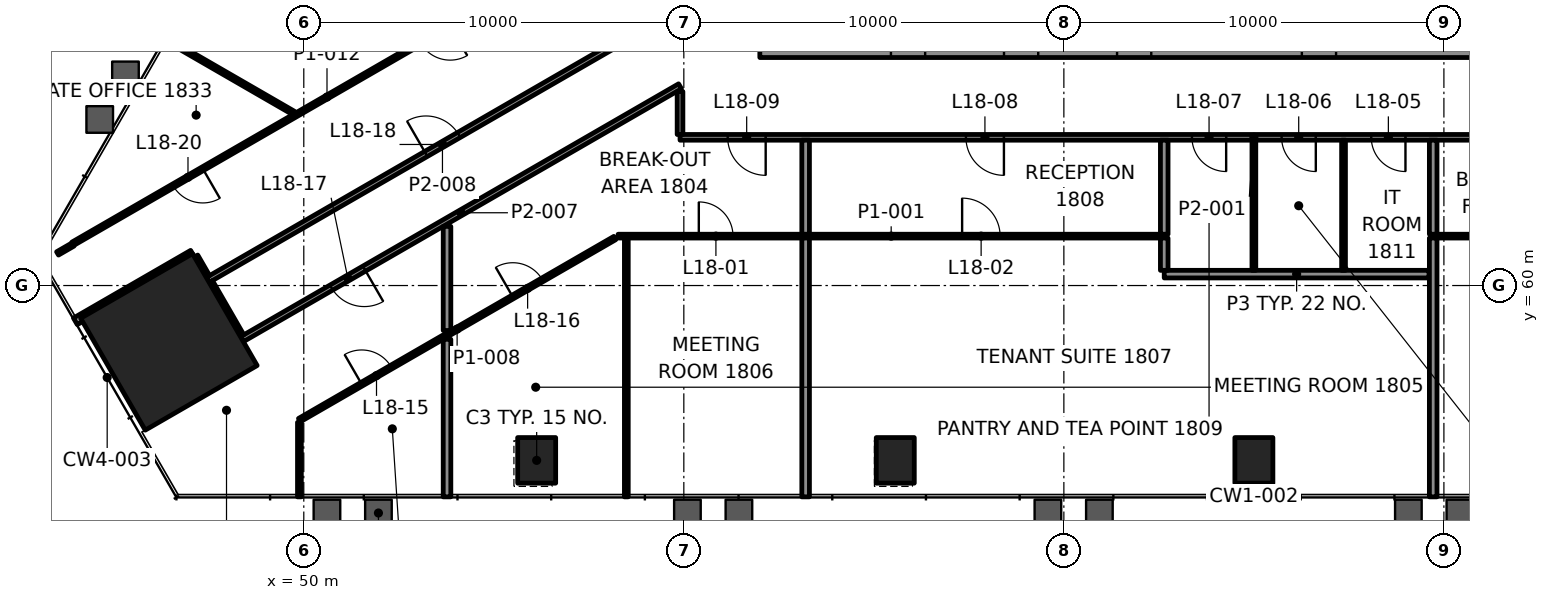
"""IFC4 building model, lengths in metres.
Left out: names, types, materials, properties, quantities, classifications, styles, units other than length and angle.
Written with IfcOpenShell. Run it as: python <this file> out.ifc"""

import sys

from ifc_helpers import new_model, si_unit, direction, frame, frame_2d, origin, origin_2d, place, context, subcontext, project, spatial, rectangle, extrude, element, fill, save


model = new_model("IFC4")
c1 = context("Model", 3, precision=1e-05, world=origin(), true_north=direction((0.0, 1.0)))
c2 = subcontext(c1, "Body", "Model", "MODEL_VIEW")
j1 = project(units=[si_unit("LENGTHUNIT", "METRE"), si_unit("PLANEANGLEUNIT", "RADIAN")], contexts=[c1])
p1 = place(None, origin())
s1 = spatial("IfcSite", under=j1, at=p1, CompositionType="ELEMENT")
p2 = place(p1, origin())
s2 = spatial("IfcBuilding", under=s1, at=p2, CompositionType="ELEMENT")
p3 = place(p2, frame((0.0, 0.0, 82.0)))
s3 = spatial("IfcBuildingStorey", under=s2, at=p3, CompositionType="ELEMENT", Elevation=82.0)
p4 = place(p3, frame((46.45, 58.517, 0.0), z_axis=(0.0, 0.0, 1.0), x_axis=(0.5, -0.866025403784, 0.0)))
e1 = element("IfcColumn", 1, at=p4, inside=s3, PredefinedType="COLUMN", context=c2, shape_type="SweptSolid", body=[
    extrude(rectangle(XDim=3.4, YDim=3.4, at=origin_2d()), origin(), (0.0, 0.0, 1.0), 4.2),
])
for number, where, z_axis, x_axis in (
    (2, (56.128, 55.399, -0.0), (0.0, 0.0, 1.0), (1.0, 0.0, 0.0)),
    (3, (65.564, 55.399, -0.0), (0.0, 0.0, 1.0), (1.0, 0.0, 0.0)),
    (4, (75.0, 55.399, -0.0), (0.0, 0.0, 1.0), (1.0, 0.0, 0.0)),
):
    element("IfcColumn", number, at=place(p3, frame(where, z_axis=z_axis, x_axis=x_axis)), inside=s3, PredefinedType="COLUMN", context=c2, shape_type="SweptSolid", body=[
        extrude(rectangle(XDim=1.0, YDim=1.2, at=origin_2d()), origin(), (0.0, 0.0, 1.0), 4.2),
    ])
p5 = place(p3, frame((62.0, 66.45, 0.0), z_axis=(0.0, 0.0, 1.0), x_axis=(1.0, 0.0, 0.0)))
e5 = element("IfcWall", 5, at=p5, inside=s3, PredefinedType="SHEAR", context=c2, shape_type="SweptSolid", body=[
    extrude(rectangle(XDim=26.0, YDim=0.9, at=frame_2d((13.0, 0.0))), origin(), (0.0, 0.0, 1.0), 4.0),
])
p6 = place(p5, frame((3.45, 0.0, 0.0)))
e6 = element("IfcOpeningElement", 6, at=p6, cuts=e5, PredefinedType="OPENING", context=c2, shape_type="SweptSolid", body=[
    extrude(rectangle(XDim=0.9, YDim=2.1, at=frame_2d((0.45, 1.05))), frame((0.0, 0.46, 0.0), z_axis=(0.0, -1.0, 0.0), x_axis=(1.0, 0.0, 0.0)), (0.0, 0.0, 1.0), 0.92),
])
p7 = place(p5, frame((6.425, 0.0, 0.0)))
e7 = element("IfcOpeningElement", 7, at=p7, cuts=e5, PredefinedType="OPENING", context=c2, shape_type="SweptSolid", body=[
    extrude(rectangle(XDim=0.9, YDim=2.1, at=frame_2d((0.45, 1.05))), frame((0.0, 0.46, 0.0), z_axis=(0.0, -1.0, 0.0), x_axis=(1.0, 0.0, 0.0)), (0.0, 0.0, 1.0), 0.92),
])
p8 = place(p5, frame((9.4, 0.0, 0.0)))
e8 = element("IfcOpeningElement", 8, at=p8, cuts=e5, PredefinedType="OPENING", context=c2, shape_type="SweptSolid", body=[
    extrude(rectangle(XDim=0.9, YDim=2.1, at=frame_2d((0.45, 1.05))), frame((0.0, 0.46, 0.0), z_axis=(0.0, -1.0, 0.0), x_axis=(1.0, 0.0, 0.0)), (0.0, 0.0, 1.0), 0.92),
])
p9 = place(p5, frame((14.262, 0.0, 0.0)))
e9 = element("IfcOpeningElement", 9, at=p9, cuts=e5, PredefinedType="OPENING", context=c2, shape_type="SweptSolid", body=[
    extrude(rectangle(XDim=0.9, YDim=2.1, at=frame_2d((0.45, 1.05))), frame((0.0, 0.46, 0.0), z_axis=(0.0, -1.0, 0.0), x_axis=(1.0, 0.0, 0.0)), (0.0, 0.0, 1.0), 0.92),
])
p10 = place(p5, frame((21.188, 0.0, 0.0)))
e10 = element("IfcOpeningElement", 10, at=p10, cuts=e5, PredefinedType="OPENING", context=c2, shape_type="SweptSolid", body=[
    extrude(rectangle(XDim=0.9, YDim=2.1, at=frame_2d((0.45, 1.05))), frame((0.0, 0.46, 0.0), z_axis=(0.0, -1.0, 0.0), x_axis=(1.0, 0.0, 0.0)), (0.0, 0.0, 1.0), 0.92),
])
p11 = place(p3, frame((72.641, 60.3, 0.0), z_axis=(0.0, 0.0, 1.0), x_axis=(1.0, 0.0, 0.0)))
e11 = element("IfcWall", 11, at=p11, inside=s3, PredefinedType="PARTITIONING", context=c2, shape_type="SweptSolid", body=[
    extrude(rectangle(XDim=6.967, YDim=0.2, at=frame_2d((3.484, 0.0))), origin(), (0.0, 0.0, 1.0), 3.4),
])
p12 = place(p3, frame((58.271, 61.3, 0.0), z_axis=(0.0, 0.0, 1.0), x_axis=(1.0, 0.0, 0.0)))
e12 = element("IfcWall", 12, at=p12, inside=s3, PredefinedType="PARTITIONING", context=c2, shape_type="SweptSolid", body=[
    extrude(rectangle(XDim=14.37, YDim=0.1, at=frame_2d((7.185, 0.0))), origin(), (0.0, 0.0, 1.0), 3.4),
])
p13 = place(p12, frame((2.123, 0.0, 0.0)))
e13 = element("IfcOpeningElement", 13, at=p13, cuts=e12, PredefinedType="OPENING", context=c2, shape_type="SweptSolid", body=[
    extrude(rectangle(XDim=0.9, YDim=2.1, at=frame_2d((0.45, 1.05))), frame((0.0, 0.06, 0.0), z_axis=(0.0, -1.0, 0.0), x_axis=(1.0, 0.0, 0.0)), (0.0, 0.0, 1.0), 0.12),
])
p14 = place(p12, frame((9.052, 0.0, 0.0)))
e14 = element("IfcOpeningElement", 14, at=p14, cuts=e12, PredefinedType="OPENING", context=c2, shape_type="SweptSolid", body=[
    extrude(rectangle(XDim=1.0, YDim=2.1, at=frame_2d((0.5, 1.05))), frame((0.0, 0.06, 0.0), z_axis=(0.0, -1.0, 0.0), x_axis=(1.0, 0.0, 0.0)), (0.0, 0.0, 1.0), 0.12),
])
p15 = place(p3, frame((79.718, 61.3, 0.0), z_axis=(0.0, 0.0, 1.0), x_axis=(1.0, 0.0, 0.0)))
e15 = element("IfcWall", 15, at=p15, inside=s3, PredefinedType="PARTITIONING", context=c2, shape_type="SweptSolid", body=[
    extrude(rectangle(XDim=11.911, YDim=0.1, at=frame_2d((5.956, 0.0))), origin(), (0.0, 0.0, 1.0), 3.4),
])
p16 = place(p15, frame((5.355, 0.0, 0.0)))
e16 = element("IfcOpeningElement", 16, at=p16, cuts=e15, PredefinedType="OPENING", context=c2, shape_type="SweptSolid", body=[
    extrude(rectangle(XDim=1.2, YDim=2.1, at=frame_2d((0.6, 1.05))), frame((0.0, 0.06, 0.0), z_axis=(0.0, -1.0, 0.0), x_axis=(1.0, 0.0, 0.0)), (0.0, 0.0, 1.0), 0.12),
])
p17 = place(p3, frame((90.1, 63.9, 0.0), z_axis=(0.0, 0.0, 1.0), x_axis=(-1.0, 0.0, 0.0)))
e17 = element("IfcWall", 17, at=p17, inside=s3, PredefinedType="PARTITIONING", context=c2, shape_type="SweptSolid", body=[
    extrude(rectangle(XDim=30.2, YDim=0.15, at=frame_2d((15.1, 0.0))), origin(), (0.0, 0.0, 1.0), 3.4),
])
p18 = place(p17, frame((4.792, 0.0, 0.0)))
e18 = element("IfcOpeningElement", 18, at=p18, cuts=e17, PredefinedType="OPENING", context=c2, shape_type="SweptSolid", body=[
    extrude(rectangle(XDim=1.0, YDim=2.1, at=frame_2d((0.5, 1.05))), frame((0.0, 0.085, 0.0), z_axis=(0.0, -1.0, 0.0), x_axis=(1.0, 0.0, 0.0)), (0.0, 0.0, 1.0), 0.17),
])
p19 = place(p17, frame((11.111, 0.0, 0.0)))
e19 = element("IfcOpeningElement", 19, at=p19, cuts=e17, PredefinedType="OPENING", context=c2, shape_type="SweptSolid", body=[
    extrude(rectangle(XDim=0.9, YDim=2.1, at=frame_2d((0.45, 1.05))), frame((0.0, 0.085, 0.0), z_axis=(0.0, -1.0, 0.0), x_axis=(1.0, 0.0, 0.0)), (0.0, 0.0, 1.0), 0.17),
])
p20 = place(p17, frame((13.47, 0.0, 0.0)))
e20 = element("IfcOpeningElement", 20, at=p20, cuts=e17, PredefinedType="OPENING", context=c2, shape_type="SweptSolid", body=[
    extrude(rectangle(XDim=0.9, YDim=2.1, at=frame_2d((0.45, 1.05))), frame((0.0, 0.085, 0.0), z_axis=(0.0, -1.0, 0.0), x_axis=(1.0, 0.0, 0.0)), (0.0, 0.0, 1.0), 0.17),
])
p21 = place(p17, frame((15.83, 0.0, 0.0)))
e21 = element("IfcOpeningElement", 21, at=p21, cuts=e17, PredefinedType="OPENING", context=c2, shape_type="SweptSolid", body=[
    extrude(rectangle(XDim=0.9, YDim=2.1, at=frame_2d((0.45, 1.05))), frame((0.0, 0.085, 0.0), z_axis=(0.0, -1.0, 0.0), x_axis=(1.0, 0.0, 0.0)), (0.0, 0.0, 1.0), 0.17),
])
p22 = place(p17, frame((21.677, 0.0, 0.0)))
e22 = element("IfcOpeningElement", 22, at=p22, cuts=e17, PredefinedType="OPENING", context=c2, shape_type="SweptSolid", body=[
    extrude(rectangle(XDim=1.0, YDim=2.1, at=frame_2d((0.5, 1.05))), frame((0.0, 0.085, 0.0), z_axis=(0.0, -1.0, 0.0), x_axis=(1.0, 0.0, 0.0)), (0.0, 0.0, 1.0), 0.17),
])
p23 = place(p17, frame((27.946, 0.0, 0.0)))
e23 = element("IfcOpeningElement", 23, at=p23, cuts=e17, PredefinedType="OPENING", context=c2, shape_type="SweptSolid", body=[
    extrude(rectangle(XDim=1.0, YDim=2.1, at=frame_2d((0.5, 1.05))), frame((0.0, 0.085, 0.0), z_axis=(0.0, -1.0, 0.0), x_axis=(1.0, 0.0, 0.0)), (0.0, 0.0, 1.0), 0.17),
])
p24 = place(p3, frame((49.885, 56.458, 0.0), z_axis=(0.0, 0.0, 1.0), x_axis=(0.866030313286, 0.499991496398, 0.0)))
e24 = element("IfcWall", 24, at=p24, inside=s3, PredefinedType="PARTITIONING", context=c2, shape_type="SweptSolid", body=[
    extrude(rectangle(XDim=9.583, YDim=0.1, at=frame_2d((4.792, 0.0))), origin(), (0.0, 0.0, 1.0), 3.4),
])
p25 = place(p24, frame((1.892, 0.0, 0.0)))
e25 = element("IfcOpeningElement", 25, at=p25, cuts=e24, PredefinedType="OPENING", context=c2, shape_type="SweptSolid", body=[
    extrude(rectangle(XDim=0.9, YDim=2.1, at=frame_2d((0.45, 1.05))), frame((0.0, 0.06, 0.0), z_axis=(0.0, -1.0, 0.0), x_axis=(1.0, 0.0, 0.0)), (0.0, 0.0, 1.0), 0.12),
])
p26 = place(p24, frame((6.484, 0.0, 0.0)))
e26 = element("IfcOpeningElement", 26, at=p26, cuts=e24, PredefinedType="OPENING", context=c2, shape_type="SweptSolid", body=[
    extrude(rectangle(XDim=0.9, YDim=2.1, at=frame_2d((0.45, 1.05))), frame((0.0, 0.06, 0.0), z_axis=(0.0, -1.0, 0.0), x_axis=(1.0, 0.0, 0.0)), (0.0, 0.0, 1.0), 0.12),
])
p27 = place(p3, frame((59.9, 65.243, 0.0), z_axis=(0.0, 0.0, 1.0), x_axis=(-0.866025527764, -0.499999785261, 0.0)))
e27 = element("IfcWall", 27, at=p27, inside=s3, PredefinedType="PARTITIONING", context=c2, shape_type="SweptSolid", body=[
    extrude(rectangle(XDim=13.31, YDim=0.15, at=frame_2d((6.655, 0.0))), origin(), (0.0, 0.0, 1.0), 3.247),
])
p28 = place(p27, frame((9.594, 0.0, 0.0)))
e28 = element("IfcOpeningElement", 28, at=p28, cuts=e27, PredefinedType="OPENING", context=c2, shape_type="SweptSolid", body=[
    extrude(rectangle(XDim=1.0, YDim=2.1, at=frame_2d((0.5, 1.05))), frame((0.0, 0.085, 0.0), z_axis=(0.0, -1.0, 0.0), x_axis=(1.0, 0.0, 0.0)), (0.0, 0.0, 1.0), 0.17),
])
p29 = place(p3, frame((47.473, 60.146, 0.0), z_axis=(0.0, 0.0, 1.0), x_axis=(0.866025677055, 0.499999526681, 0.0)))
e29 = element("IfcWall", 29, at=p29, inside=s3, PredefinedType="PARTITIONING", context=c2, shape_type="SweptSolid", body=[
    extrude(rectangle(XDim=14.263, YDim=0.15, at=frame_2d((7.132, 0.0))), origin(), (0.0, 0.0, 1.0), 3.4),
])
p30 = place(p29, frame((6.632, 0.0, 0.0)))
e30 = element("IfcOpeningElement", 30, at=p30, cuts=e29, PredefinedType="OPENING", context=c2, shape_type="SweptSolid", body=[
    extrude(rectangle(XDim=1.0, YDim=2.1, at=frame_2d((0.5, 1.05))), frame((0.0, 0.085, 0.0), z_axis=(0.0, -1.0, 0.0), x_axis=(1.0, 0.0, 0.0)), (0.0, 0.0, 1.0), 0.17),
])
p31 = place(p3, frame((43.99, 59.058, 0.0), z_axis=(0.0, 0.0, 1.0), x_axis=(0.866031398331, 0.499989616998, 0.0)))
e31 = element("IfcWall", 31, at=p31, inside=s3, PredefinedType="PARTITIONING", context=c2, shape_type="SweptSolid", body=[
    extrude(rectangle(XDim=3.56, YDim=0.2, at=frame_2d((1.78, 0.0))), origin(), (0.0, 0.0, 1.0), 3.4),
])
p32 = place(p3, frame((43.521, 60.845, 0.0), z_axis=(0.0, 0.0, 1.0), x_axis=(0.865979310119, 0.500079828073, 0.0)))
e32 = element("IfcWall", 32, at=p32, inside=s3, PredefinedType="PARTITIONING", context=c2, shape_type="SweptSolid", body=[
    extrude(rectangle(XDim=0.473, YDim=0.1, at=frame_2d((0.237, 0.0))), origin(), (0.0, 0.0, 1.0), 3.4),
])
p33 = place(p3, frame((57.3, 68.823, 0.0), z_axis=(0.0, 0.0, 1.0), x_axis=(-0.866026891502, -0.499997423189, 0.0)))
e33 = element("IfcWall", 33, at=p33, inside=s3, PredefinedType="PARTITIONING", context=c2, shape_type="SweptSolid", body=[
    extrude(rectangle(XDim=15.448, YDim=0.1, at=frame_2d((7.724, 0.0))), origin(), (0.0, 0.0, 1.0), 3.4),
])
p34 = place(p33, frame((3.982, 0.0, 0.0)))
e34 = element("IfcOpeningElement", 34, at=p34, cuts=e33, PredefinedType="OPENING", context=c2, shape_type="SweptSolid", body=[
    extrude(rectangle(XDim=0.9, YDim=2.1, at=frame_2d((0.45, 1.05))), frame((0.0, 0.06, 0.0), z_axis=(0.0, -1.0, 0.0), x_axis=(1.0, 0.0, 0.0)), (0.0, 0.0, 1.0), 0.12),
])
p35 = place(p33, frame((11.498, 0.0, 0.0)))
e35 = element("IfcOpeningElement", 35, at=p35, cuts=e33, PredefinedType="OPENING", context=c2, shape_type="SweptSolid", body=[
    extrude(rectangle(XDim=0.9, YDim=2.1, at=frame_2d((0.45, 1.05))), frame((0.0, 0.06, 0.0), z_axis=(0.0, -1.0, 0.0), x_axis=(1.0, 0.0, 0.0)), (0.0, 0.0, 1.0), 0.12),
])
p36 = place(p3, frame((79.718, 54.439, 0.0), z_axis=(0.0, 0.0, 1.0), x_axis=(0.0, 1.0, 0.0)))
e36 = element("IfcWall", 36, at=p36, inside=s3, PredefinedType="PARTITIONING", context=c2, shape_type="SweptSolid", body=[
    extrude(rectangle(XDim=6.811, YDim=0.2, at=frame_2d((3.405, 0.0))), origin(), (0.0, 0.0, 1.0), 3.165),
])
for number, where, z_axis, x_axis in (
    (37, (77.359, 60.4, 0.0), (0.0, 0.0, 1.0), (0.0, 1.0, 0.0)),
    (38, (75.0, 60.4, 0.0), (0.0, 0.0, 1.0), (0.0, 1.0, 0.0)),
):
    element("IfcWall", number, at=place(p3, frame(where, z_axis=z_axis, x_axis=x_axis)), inside=s3, PredefinedType="PARTITIONING", context=c2, shape_type="SweptSolid", body=[
        extrude(rectangle(XDim=3.425, YDim=0.1, at=frame_2d((1.712, 0.0))), origin(), (0.0, 0.0, 1.0), 3.4),
    ])
p37 = place(p3, frame((72.641, 60.4, 0.0), z_axis=(0.0, 0.0, 1.0), x_axis=(0.0, 1.0, 0.0)))
e39 = element("IfcWall", 39, at=p37, inside=s3, PredefinedType="PARTITIONING", context=c2, shape_type="SweptSolid", body=[
    extrude(rectangle(XDim=0.85, YDim=0.2, at=frame_2d((0.425, 0.0))), origin(), (0.0, 0.0, 1.0), 3.4),
])
p38 = place(p3, frame((63.205, 54.439, 0.0), z_axis=(0.0, 0.0, 1.0), x_axis=(0.0, 1.0, 0.0)))
e40 = element("IfcWall", 40, at=p38, inside=s3, PredefinedType="PARTITIONING", context=c2, shape_type="SweptSolid", body=[
    extrude(rectangle(XDim=6.811, YDim=0.2, at=frame_2d((3.405, 0.0))), origin(), (0.0, 0.0, 1.0), 3.165),
])
p39 = place(p3, frame((59.9, 63.975, 0.0), z_axis=(0.0, 0.0, 1.0), x_axis=(0.0, 1.0, 0.0)))
e41 = element("IfcWall", 41, at=p39, inside=s3, PredefinedType="PARTITIONING", context=c2, shape_type="SweptSolid", body=[
    extrude(rectangle(XDim=1.131, YDim=0.15, at=frame_2d((0.565, 0.0))), origin(), (0.0, 0.0, 1.0), 3.247),
])
p40 = place(p3, frame((58.487, 54.439, 0.0), z_axis=(0.0, 0.0, 1.0), x_axis=(0.0, 1.0, 0.0)))
e42 = element("IfcWall", 42, at=p40, inside=s3, PredefinedType="PARTITIONING", context=c2, shape_type="SweptSolid", body=[
    extrude(rectangle(XDim=6.811, YDim=0.1, at=frame_2d((3.405, 0.0))), origin(), (0.0, 0.0, 1.0), 3.165),
])
p41 = place(p3, frame((53.769, 54.439, 0.0), z_axis=(0.0, 0.0, 1.0), x_axis=(0.0, 1.0, 0.0)))
e43 = element("IfcWall", 43, at=p41, inside=s3, PredefinedType="PARTITIONING", context=c2, shape_type="SweptSolid", body=[
    extrude(rectangle(XDim=4.146, YDim=0.2, at=frame_2d((2.073, 0.0))), origin(), (0.0, 0.0, 1.0), 3.4),
])
p42 = place(p3, frame((49.885, 54.439, 0.0), z_axis=(0.0, 0.0, 1.0), x_axis=(0.0, 1.0, 0.0)))
e44 = element("IfcWall", 44, at=p42, inside=s3, PredefinedType="PARTITIONING", context=c2, shape_type="SweptSolid", body=[
    extrude(rectangle(XDim=1.961, YDim=0.1, at=frame_2d((0.981, 0.0))), origin(), (0.0, 0.0, 1.0), 3.4),
])
p43 = place(p3, frame((48.335, 58.653, 0.0), z_axis=(0.0, 0.0, 1.0), x_axis=(-0.499991515992, 0.866030301974, 0.0)))
e45 = element("IfcWall", 45, at=p43, inside=s3, PredefinedType="PARTITIONING", context=c2, shape_type="SweptSolid", body=[
    extrude(rectangle(XDim=1.649, YDim=0.2, at=frame_2d((0.825, 0.0))), origin(), (0.0, 0.0, 1.0), 3.247),
])
p44 = place(p3, frame((49.732, 64.541, 0.0), z_axis=(0.0, 0.0, 1.0), x_axis=(-0.866020177134, 0.500009052715, 0.0)))
e46 = element("IfcWall", 46, at=p44, inside=s3, PredefinedType="PARTITIONING", context=c2, shape_type="SweptSolid", body=[
    extrude(rectangle(XDim=3.908, YDim=0.1, at=frame_2d((1.954, 0.0))), origin(), (0.0, 0.0, 1.0), 3.4),
])
for number, where, z_axis, x_axis in (
    (47, (72.641, 61.35, 0.0), (0.0, 0.0, 1.0), (0.0, 1.0, 0.0)),
    (48, (79.718, 61.35, 0.0), (0.0, 0.0, 1.0), (0.0, 1.0, 0.0)),
):
    element("IfcWall", number, at=place(p3, frame(where, z_axis=z_axis, x_axis=x_axis)), inside=s3, PredefinedType="PARTITIONING", context=c2, shape_type="SweptSolid", body=[
        extrude(rectangle(XDim=2.475, YDim=0.2, at=frame_2d((1.237, 0.0))), origin(), (0.0, 0.0, 1.0), 3.4),
    ])
p45 = place(p3, frame((53.769, 58.816, 0.0), z_axis=(0.0, 0.0, 1.0), x_axis=(0.0, 1.0, 0.0)))
e49 = element("IfcWall", 49, at=p45, inside=s3, PredefinedType="PARTITIONING", context=c2, shape_type="SweptSolid", body=[
    extrude(rectangle(XDim=2.74, YDim=0.2, at=frame_2d((1.37, 0.0))), origin(), (0.0, 0.0, 1.0), 3.4),
])
p46 = place(p3, frame((47.435, 60.211, 0.0), z_axis=(0.0, 0.0, 1.0), x_axis=(-0.499801510763, 0.866139971275, 0.0)))
e50 = element("IfcWall", 50, at=p46, inside=s3, PredefinedType="PARTITIONING", context=c2, shape_type="SweptSolid", body=[
    extrude(rectangle(XDim=0.624, YDim=0.2, at=frame_2d((0.312, 0.0))), origin(), (0.0, 0.0, 1.0), 3.4),
])
p47 = place(p3, frame((63.205, 61.35, 0.0), z_axis=(0.0, 0.0, 1.0), x_axis=(0.0, 1.0, 0.0)))
e51 = element("IfcWall", 51, at=p47, inside=s3, PredefinedType="PARTITIONING", context=c2, shape_type="SweptSolid", body=[
    extrude(rectangle(XDim=2.475, YDim=0.2, at=frame_2d((1.237, 0.0))), origin(), (0.0, 0.0, 1.0), 3.4),
])
p48 = place(p3, frame((110.601, 61.239, 0.0), z_axis=(0.0, 0.0, 1.0), x_axis=(-0.499998492585, 0.866026274089, 0.0)))
e52 = element("IfcWall", 52, at=p48, inside=s3, PredefinedType="SOLIDWALL", context=c2, shape_type="SweptSolid", body=[
    extrude(rectangle(XDim=59.436, YDim=0.8, at=frame_2d((29.718, 0.0))), origin(), (0.0, 0.0, 1.0), 0.9),
])
p49 = place(p13, origin())
e53 = element("IfcDoor", 53, at=p49, inside=s3, OperationType="SINGLE_SWING_LEFT", PredefinedType="DOOR", context=c2, shape_type="SweptSolid", body=[
    extrude(rectangle(XDim=0.9, YDim=2.1, at=frame_2d((0.45, 1.05))), frame((0.0, 0.025, 0.0), z_axis=(0.0, -1.0, 0.0), x_axis=(1.0, 0.0, 0.0)), (0.0, 0.0, 1.0), 0.05),
])
fill(e13, e53)
p50 = place(p14, origin())
e54 = element("IfcDoor", 54, at=p50, inside=s3, OperationType="SINGLE_SWING_RIGHT", PredefinedType="DOOR", context=c2, shape_type="SweptSolid", body=[
    extrude(rectangle(XDim=1.0, YDim=2.1, at=frame_2d((0.5, 1.05))), frame((0.0, 0.025, 0.0), z_axis=(0.0, -1.0, 0.0), x_axis=(1.0, 0.0, 0.0)), (0.0, 0.0, 1.0), 0.05),
])
fill(e14, e54)
p51 = place(p19, origin())
e55 = element("IfcDoor", 55, at=p51, inside=s3, OperationType="SINGLE_SWING_LEFT", PredefinedType="DOOR", context=c2, shape_type="SweptSolid", body=[
    extrude(rectangle(XDim=0.9, YDim=2.1, at=frame_2d((0.45, 1.05))), frame((0.0, 0.025, 0.0), z_axis=(0.0, -1.0, 0.0), x_axis=(1.0, 0.0, 0.0)), (0.0, 0.0, 1.0), 0.05),
])
fill(e19, e55)
p52 = place(p20, origin())
e56 = element("IfcDoor", 56, at=p52, inside=s3, OperationType="SINGLE_SWING_RIGHT", PredefinedType="DOOR", context=c2, shape_type="SweptSolid", body=[
    extrude(rectangle(XDim=0.9, YDim=2.1, at=frame_2d((0.45, 1.05))), frame((0.0, 0.025, 0.0), z_axis=(0.0, -1.0, 0.0), x_axis=(1.0, 0.0, 0.0)), (0.0, 0.0, 1.0), 0.05),
])
fill(e20, e56)
p53 = place(p21, origin())
e57 = element("IfcDoor", 57, at=p53, inside=s3, OperationType="SINGLE_SWING_LEFT", PredefinedType="DOOR", context=c2, shape_type="SweptSolid", body=[
    extrude(rectangle(XDim=0.9, YDim=2.1, at=frame_2d((0.45, 1.05))), frame((0.0, 0.025, 0.0), z_axis=(0.0, -1.0, 0.0), x_axis=(1.0, 0.0, 0.0)), (0.0, 0.0, 1.0), 0.05),
])
fill(e21, e57)
p54 = place(p22, origin())
e58 = element("IfcDoor", 58, at=p54, inside=s3, OperationType="SINGLE_SWING_RIGHT", PredefinedType="DOOR", context=c2, shape_type="SweptSolid", body=[
    extrude(rectangle(XDim=1.0, YDim=2.1, at=frame_2d((0.5, 1.05))), frame((0.0, 0.025, 0.0), z_axis=(0.0, -1.0, 0.0), x_axis=(1.0, 0.0, 0.0)), (0.0, 0.0, 1.0), 0.05),
])
fill(e22, e58)
p55 = place(p23, origin())
e59 = element("IfcDoor", 59, at=p55, inside=s3, OperationType="SINGLE_SWING_RIGHT", PredefinedType="DOOR", context=c2, shape_type="SweptSolid", body=[
    extrude(rectangle(XDim=1.0, YDim=2.1, at=frame_2d((0.5, 1.05))), frame((0.0, 0.025, 0.0), z_axis=(0.0, -1.0, 0.0), x_axis=(1.0, 0.0, 0.0)), (0.0, 0.0, 1.0), 0.05),
])
fill(e23, e59)
p56 = place(p25, origin())
e60 = element("IfcDoor", 60, at=p56, inside=s3, OperationType="SINGLE_SWING_RIGHT", PredefinedType="DOOR", context=c2, shape_type="SweptSolid", body=[
    extrude(rectangle(XDim=0.9, YDim=2.1, at=frame_2d((0.45, 1.05))), frame((0.0, 0.025, 0.0), z_axis=(0.0, -1.0, 0.0), x_axis=(1.0, 0.0, 0.0)), (0.0, 0.0, 1.0), 0.05),
])
fill(e25, e60)
p57 = place(p26, origin())
e61 = element("IfcDoor", 61, at=p57, inside=s3, OperationType="SINGLE_SWING_RIGHT", PredefinedType="DOOR", context=c2, shape_type="SweptSolid", body=[
    extrude(rectangle(XDim=0.9, YDim=2.1, at=frame_2d((0.45, 1.05))), frame((0.0, 0.025, 0.0), z_axis=(0.0, -1.0, 0.0), x_axis=(1.0, 0.0, 0.0)), (0.0, 0.0, 1.0), 0.05),
])
fill(e26, e61)
p58 = place(p28, origin())
e62 = element("IfcDoor", 62, at=p58, inside=s3, OperationType="SINGLE_SWING_RIGHT", PredefinedType="DOOR", context=c2, shape_type="SweptSolid", body=[
    extrude(rectangle(XDim=1.0, YDim=2.1, at=frame_2d((0.5, 1.05))), frame((0.0, 0.025, 0.0), z_axis=(0.0, -1.0, 0.0), x_axis=(1.0, 0.0, 0.0)), (0.0, 0.0, 1.0), 0.05),
])
fill(e28, e62)
p59 = place(p30, origin())
e63 = element("IfcDoor", 63, at=p59, inside=s3, OperationType="SINGLE_SWING_LEFT", PredefinedType="DOOR", context=c2, shape_type="SweptSolid", body=[
    extrude(rectangle(XDim=1.0, YDim=2.1, at=frame_2d((0.5, 1.05))), frame((0.0, 0.025, 0.0), z_axis=(0.0, -1.0, 0.0), x_axis=(1.0, 0.0, 0.0)), (0.0, 0.0, 1.0), 0.05),
])
fill(e30, e63)
p60 = place(p35, origin())
e64 = element("IfcDoor", 64, at=p60, inside=s3, OperationType="SINGLE_SWING_LEFT", PredefinedType="DOOR", context=c2, shape_type="SweptSolid", body=[
    extrude(rectangle(XDim=0.9, YDim=2.1, at=frame_2d((0.45, 1.05))), frame((0.0, 0.025, 0.0), z_axis=(0.0, -1.0, 0.0), x_axis=(1.0, 0.0, 0.0)), (0.0, 0.0, 1.0), 0.05),
])
fill(e35, e64)
save(model, sys.argv[1])
